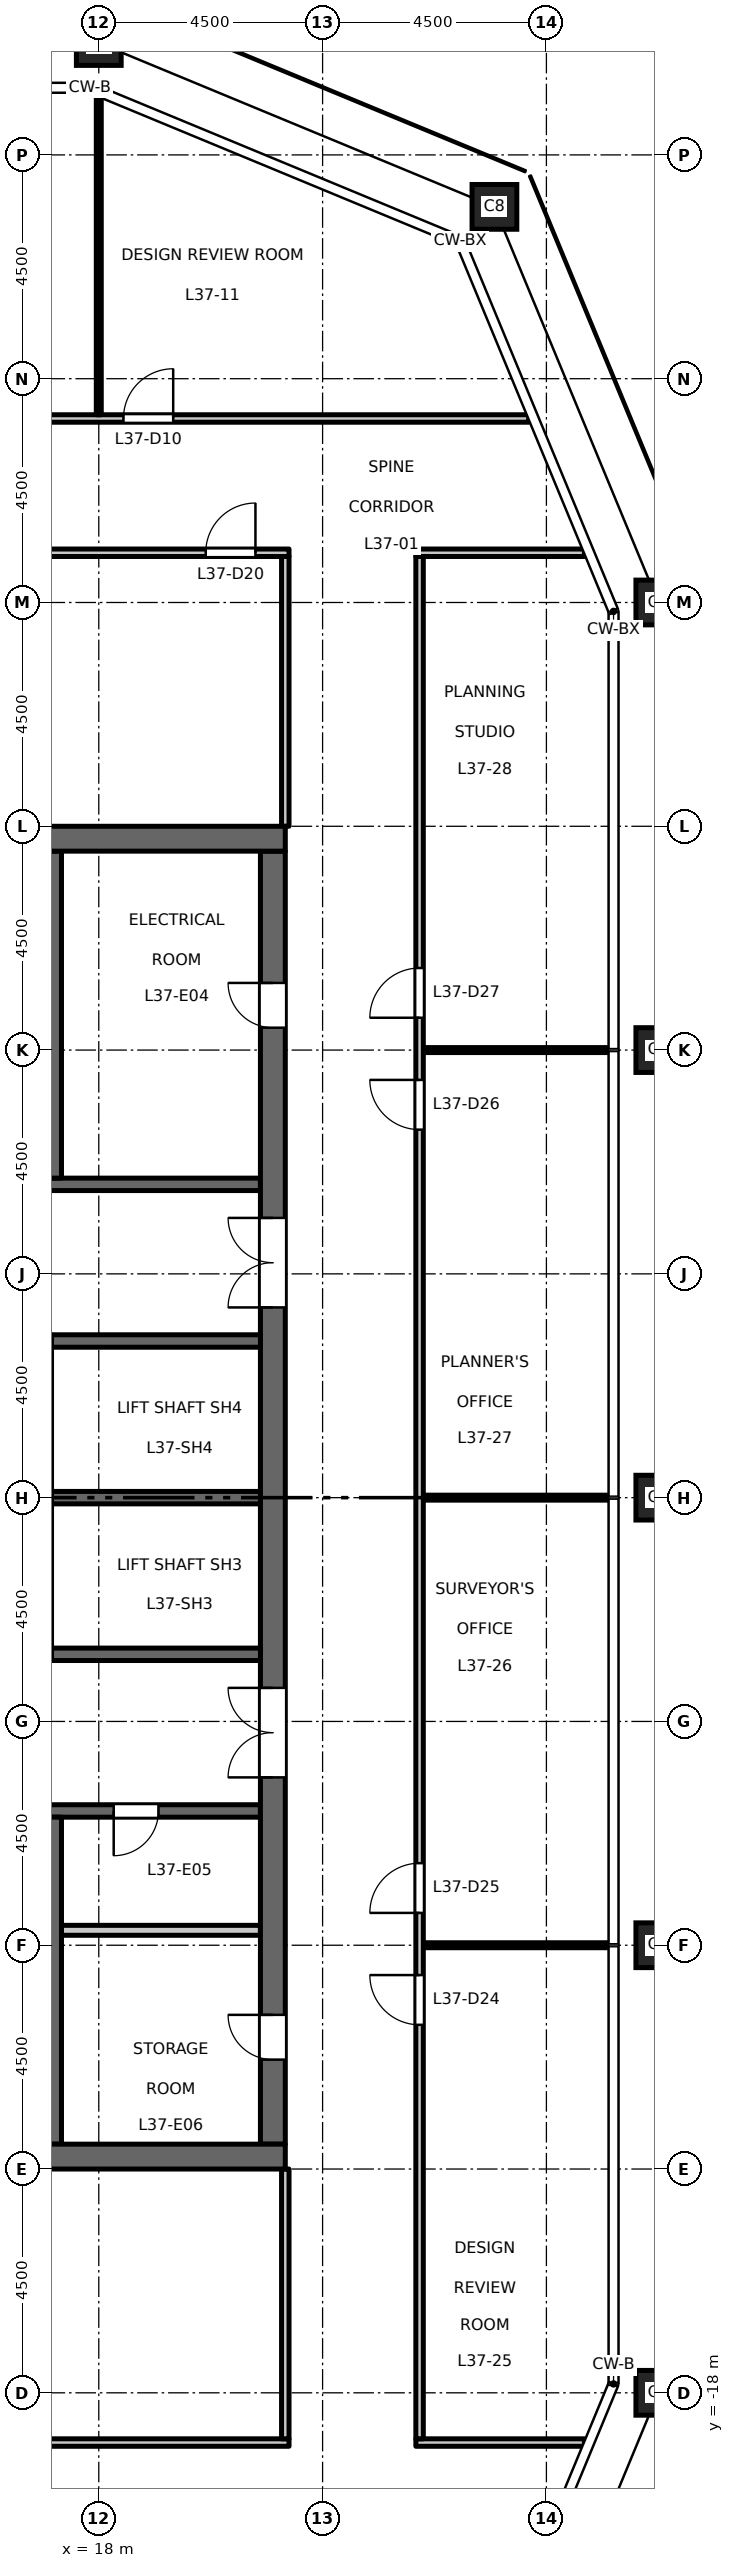
"""IFC4 building model, lengths in metres.
Left out: names, types, materials, properties, quantities, classifications, styles, units other than length and angle.
Written with IfcOpenShell. Run it as: python <this file> out.ifc"""

import sys

from ifc_helpers import new_model, si_unit, direction, frame, frame_2d, origin, origin_2d, place, context, subcontext, project, spatial, rectangle, hollow_rectangle, extrude, element, fill, save


model = new_model("IFC4")
c1 = context("Model", 3, precision=1e-05, world=origin(), true_north=direction((0.0, 1.0)))
c2 = subcontext(c1, "Body", "Model", "MODEL_VIEW")
j1 = project(units=[si_unit("LENGTHUNIT", "METRE"), si_unit("PLANEANGLEUNIT", "RADIAN")], contexts=[c1])
p1 = place(None, origin())
s1 = spatial("IfcSite", under=j1, at=p1, CompositionType="ELEMENT")
p2 = place(p1, origin())
s2 = spatial("IfcBuilding", under=s1, at=p2, CompositionType="ELEMENT")
p3 = place(p2, frame((0.0, 0.0, 172.2)))
s3 = spatial("IfcBuildingStorey", under=s2, at=p3, CompositionType="ELEMENT", Elevation=172.2)
for number, where, z_axis, x_axis in (
    (1, (29.25, -18.0, 0.0), (0.0, 0.0, 1.0), (1.0, 0.0, 0.0)),
    (2, (29.25, -9.0, 0.0), (0.0, 0.0, 1.0), (1.0, 0.0, 0.0)),
    (3, (29.25, 0.0, 0.0), (0.0, 0.0, 1.0), (1.0, 0.0, 0.0)),
    (4, (29.25, 9.0, 0.0), (0.0, 0.0, 1.0), (1.0, 0.0, 0.0)),
    (5, (29.25, 18.0, 0.0), (0.0, 0.0, 1.0), (1.0, 0.0, 0.0)),
    (6, (25.955, 25.955, 0.0), (0.0, 0.0, 1.0), (1.0, 0.0, 0.0)),
    (7, (18.0, 29.25, 0.0), (0.0, 0.0, 1.0), (1.0, 0.0, 0.0)),
):
    element("IfcColumn", number, at=place(p3, frame(where, z_axis=z_axis, x_axis=x_axis)), inside=s3, PredefinedType="COLUMN", context=c2, shape_type="SweptSolid", body=[
        extrude(hollow_rectangle(XDim=0.9, YDim=0.9, WallThickness=0.05, at=origin_2d()), origin(), (0.0, 0.0, 1.0), 4.5),
    ])
p4 = place(p3, frame((17.0, 6.3, 0.0), z_axis=(0.0, 0.0, 1.0), x_axis=(1.0, 0.0, 0.0)))
e8 = element("IfcWall", 8, at=p4, inside=s3, PredefinedType="SHEAR", context=c2, shape_type="SweptSolid", body=[
    extrude(rectangle(XDim=4.25, YDim=0.25, at=frame_2d((2.125, 0.0))), origin(), (0.0, 0.0, 1.0), 4.35),
])
p5 = place(p3, frame((12.15, -6.3, 0.0), z_axis=(0.0, 0.0, 1.0), x_axis=(1.0, 0.0, 0.0)))
e9 = element("IfcWall", 9, at=p5, inside=s3, PredefinedType="SHEAR", context=c2, shape_type="SweptSolid", body=[
    extrude(rectangle(XDim=9.1, YDim=0.25, at=frame_2d((4.55, 0.0))), origin(), (0.0, 0.0, 1.0), 4.35),
])
p6 = place(p5, frame((1.8, 0.0, 0.0)))
e10 = element("IfcOpeningElement", 10, at=p6, cuts=e9, PredefinedType="OPENING", context=c2, shape_type="SweptSolid", body=[
    extrude(rectangle(XDim=1.0, YDim=2.1, at=frame_2d((0.5, 1.05))), frame((0.0, 0.135, 0.0), z_axis=(0.0, -1.0, 0.0), x_axis=(1.0, 0.0, 0.0)), (0.0, 0.0, 1.0), 0.27),
])
p7 = place(p5, frame((6.15, 0.0, 0.0)))
e11 = element("IfcOpeningElement", 11, at=p7, cuts=e9, PredefinedType="OPENING", context=c2, shape_type="SweptSolid", body=[
    extrude(rectangle(XDim=0.9, YDim=2.1, at=frame_2d((0.45, 1.05))), frame((0.0, 0.135, 0.0), z_axis=(0.0, -1.0, 0.0), x_axis=(1.0, 0.0, 0.0)), (0.0, 0.0, 1.0), 0.27),
])
p8 = place(p3, frame((21.5, -13.0, 0.0), z_axis=(0.0, 0.0, 1.0), x_axis=(0.0, 1.0, 0.0)))
e12 = element("IfcWall", 12, at=p8, inside=s3, PredefinedType="SHEAR", context=c2, shape_type="SweptSolid", body=[
    extrude(rectangle(XDim=26.0, YDim=0.5, at=frame_2d((13.0, 0.0))), origin(), (0.0, 0.0, 1.0), 4.35),
])
p9 = place(p8, frame((16.825, 0.0, 0.0)))
e13 = element("IfcOpeningElement", 13, at=p9, cuts=e12, PredefinedType="OPENING", context=c2, shape_type="SweptSolid", body=[
    extrude(rectangle(XDim=1.8, YDim=2.1, at=frame_2d((0.9, 1.05))), frame((0.0, 0.26, 0.0), z_axis=(0.0, -1.0, 0.0), x_axis=(1.0, 0.0, 0.0)), (0.0, 0.0, 1.0), 0.52),
])
p10 = place(p8, frame((7.375, 0.0, 0.0)))
e14 = element("IfcOpeningElement", 14, at=p10, cuts=e12, PredefinedType="OPENING", context=c2, shape_type="SweptSolid", body=[
    extrude(rectangle(XDim=1.8, YDim=2.1, at=frame_2d((0.9, 1.05))), frame((0.0, 0.26, 0.0), z_axis=(0.0, -1.0, 0.0), x_axis=(1.0, 0.0, 0.0)), (0.0, 0.0, 1.0), 0.52),
])
p11 = place(p8, frame((22.45, 0.0, 0.0)))
e15 = element("IfcOpeningElement", 15, at=p11, cuts=e12, PredefinedType="OPENING", context=c2, shape_type="SweptSolid", body=[
    extrude(rectangle(XDim=0.9, YDim=2.1, at=frame_2d((0.45, 1.05))), frame((0.0, 0.26, 0.0), z_axis=(0.0, -1.0, 0.0), x_axis=(1.0, 0.0, 0.0)), (0.0, 0.0, 1.0), 0.52),
])
p12 = place(p8, frame((1.7, 0.0, 0.0)))
e16 = element("IfcOpeningElement", 16, at=p12, cuts=e12, PredefinedType="OPENING", context=c2, shape_type="SweptSolid", body=[
    extrude(rectangle(XDim=0.9, YDim=2.1, at=frame_2d((0.45, 1.05))), frame((0.0, 0.26, 0.0), z_axis=(0.0, -1.0, 0.0), x_axis=(1.0, 0.0, 0.0)), (0.0, 0.0, 1.0), 0.52),
])
p13 = place(p3, frame((17.25, -8.7, 0.0), z_axis=(0.0, 0.0, 1.0), x_axis=(1.0, 0.0, 0.0)))
e17 = element("IfcWall", 17, at=p13, inside=s3, PredefinedType="PARTITIONING", context=c2, shape_type="SweptSolid", body=[
    extrude(rectangle(XDim=4.0, YDim=0.2, at=frame_2d((2.0, 0.0))), origin(), (0.0, 0.0, 1.0), 4.35),
])
for number, where, z_axis, x_axis in (
    (18, (17.05, 0.0, 0.0), (0.0, 0.0, 1.0), (1.0, 0.0, 0.0)),
    (19, (17.05, 3.15, 0.0), (0.0, 0.0, 1.0), (1.0, 0.0, 0.0)),
    (20, (17.05, -3.15, 0.0), (0.0, 0.0, 1.0), (1.0, 0.0, 0.0)),
):
    element("IfcWall", number, at=place(p3, frame(where, z_axis=z_axis, x_axis=x_axis)), inside=s3, PredefinedType="SHEAR", context=c2, shape_type="SweptSolid", body=[
        extrude(rectangle(XDim=4.2, YDim=0.25, at=frame_2d((2.1, 0.0))), origin(), (0.0, 0.0, 1.0), 4.35),
    ])
for number, where, z_axis, x_axis in (
    (21, (17.0, 6.425, 0.0), (0.0, 0.0, 1.0), (0.0, 1.0, 0.0)),
    (22, (17.0, -13.0, 0.0), (0.0, 0.0, 1.0), (0.0, 1.0, 0.0)),
):
    element("IfcWall", number, at=place(p3, frame(where, z_axis=z_axis, x_axis=x_axis)), inside=s3, PredefinedType="SHEAR", context=c2, shape_type="SweptSolid", body=[
        extrude(rectangle(XDim=6.575, YDim=0.5, at=frame_2d((3.288, 0.0))), origin(), (0.0, 0.0, 1.0), 4.35),
    ])
for number, where, z_axis, x_axis in (
    (23, (8.25, 13.25, 0.0), (0.0, 0.0, 1.0), (1.0, 0.0, 0.0)),
    (24, (8.25, -13.25, 0.0), (0.0, 0.0, 1.0), (1.0, 0.0, 0.0)),
):
    element("IfcWall", number, at=place(p3, frame(where, z_axis=z_axis, x_axis=x_axis)), inside=s3, PredefinedType="SHEAR", context=c2, shape_type="SweptSolid", body=[
        extrude(rectangle(XDim=13.5, YDim=0.5, at=frame_2d((6.75, 0.0))), origin(), (0.0, 0.0, 1.0), 4.35),
    ])
p14 = place(p3, frame((-21.825, -19.0, 0.0), z_axis=(0.0, 0.0, 1.0), x_axis=(1.0, 0.0, 0.0)))
e25 = element("IfcWall", 25, at=p14, inside=s3, PredefinedType="PARTITIONING", context=c2, shape_type="SweptSolid", body=[
    extrude(rectangle(XDim=43.65, YDim=0.15, at=frame_2d((21.825, 0.0))), origin(), (0.0, 0.0, 1.0), 4.35),
])
p15 = place(p14, frame((14.175, 0.0, 0.0)))
e26 = element("IfcOpeningElement", 26, at=p15, cuts=e25, PredefinedType="OPENING", context=c2, shape_type="SweptSolid", body=[
    extrude(rectangle(XDim=1.0, YDim=2.1, at=frame_2d((0.5, 1.05))), frame((0.0, 0.085, 0.0), z_axis=(0.0, -1.0, 0.0), x_axis=(1.0, 0.0, 0.0)), (0.0, 0.0, 1.0), 0.17),
])
p16 = place(p14, frame((11.925, 0.0, 0.0)))
e27 = element("IfcOpeningElement", 27, at=p16, cuts=e25, PredefinedType="OPENING", context=c2, shape_type="SweptSolid", body=[
    extrude(rectangle(XDim=1.0, YDim=2.1, at=frame_2d((0.5, 1.05))), frame((0.0, 0.085, 0.0), z_axis=(0.0, -1.0, 0.0), x_axis=(1.0, 0.0, 0.0)), (0.0, 0.0, 1.0), 0.17),
])
p17 = place(p14, frame((30.675, 0.0, 0.0)))
e28 = element("IfcOpeningElement", 28, at=p17, cuts=e25, PredefinedType="OPENING", context=c2, shape_type="SweptSolid", body=[
    extrude(rectangle(XDim=1.0, YDim=2.1, at=frame_2d((0.5, 1.05))), frame((0.0, 0.085, 0.0), z_axis=(0.0, -1.0, 0.0), x_axis=(1.0, 0.0, 0.0)), (0.0, 0.0, 1.0), 0.17),
])
p18 = place(p3, frame((24.375, -19.0, 0.0), z_axis=(0.0, 0.0, 1.0), x_axis=(1.0, 0.0, 0.0)))
e29 = element("IfcWall", 29, at=p18, inside=s3, PredefinedType="PARTITIONING", context=c2, shape_type="SweptSolid", body=[
    extrude(rectangle(XDim=3.389, YDim=0.15, at=frame_2d((1.694, 0.0))), origin(), (0.0, 0.0, 1.0), 4.35),
])
for number, where, z_axis, x_axis in (
    (30, (24.525, -9.0, 0.0), (0.0, 0.0, 1.0), (1.0, 0.0, 0.0)),
    (31, (24.525, 0.0, 0.0), (0.0, 0.0, 1.0), (1.0, 0.0, 0.0)),
    (32, (24.525, 9.0, 0.0), (0.0, 0.0, 1.0), (1.0, 0.0, 0.0)),
):
    element("IfcWall", number, at=place(p3, frame(where, z_axis=z_axis, x_axis=x_axis)), inside=s3, PredefinedType="PARTITIONING", context=c2, shape_type="SweptSolid", body=[
        extrude(rectangle(XDim=3.735, YDim=0.1, at=frame_2d((1.868, 0.0))), origin(), (0.0, 0.0, 1.0), 4.35),
    ])
p19 = place(p3, frame((-21.825, 19.0, 0.0), z_axis=(0.0, 0.0, 1.0), x_axis=(1.0, 0.0, 0.0)))
e33 = element("IfcWall", 33, at=p19, inside=s3, PredefinedType="PARTITIONING", context=c2, shape_type="SweptSolid", body=[
    extrude(rectangle(XDim=43.65, YDim=0.15, at=frame_2d((21.825, 0.0))), origin(), (0.0, 0.0, 1.0), 4.35),
])
p20 = place(p19, frame((14.225, 0.0, 0.0)))
e34 = element("IfcOpeningElement", 34, at=p20, cuts=e33, PredefinedType="OPENING", context=c2, shape_type="SweptSolid", body=[
    extrude(rectangle(XDim=1.0, YDim=2.1, at=frame_2d((0.5, 1.05))), frame((0.0, 0.085, 0.0), z_axis=(0.0, -1.0, 0.0), x_axis=(1.0, 0.0, 0.0)), (0.0, 0.0, 1.0), 0.17),
])
p21 = place(p19, frame((0.725, 0.0, 0.0)))
e35 = element("IfcOpeningElement", 35, at=p21, cuts=e33, PredefinedType="OPENING", context=c2, shape_type="SweptSolid", body=[
    extrude(rectangle(XDim=1.0, YDim=2.1, at=frame_2d((0.5, 1.05))), frame((0.0, 0.085, 0.0), z_axis=(0.0, -1.0, 0.0), x_axis=(1.0, 0.0, 0.0)), (0.0, 0.0, 1.0), 0.17),
])
p22 = place(p19, frame((41.975, 0.0, 0.0)))
e36 = element("IfcOpeningElement", 36, at=p22, cuts=e33, PredefinedType="OPENING", context=c2, shape_type="SweptSolid", body=[
    extrude(rectangle(XDim=1.0, YDim=2.1, at=frame_2d((0.5, 1.05))), frame((0.0, 0.085, 0.0), z_axis=(0.0, -1.0, 0.0), x_axis=(1.0, 0.0, 0.0)), (0.0, 0.0, 1.0), 0.17),
])
p23 = place(p3, frame((24.375, 19.0, 0.0), z_axis=(0.0, 0.0, 1.0), x_axis=(1.0, 0.0, 0.0)))
e37 = element("IfcWall", 37, at=p23, inside=s3, PredefinedType="PARTITIONING", context=c2, shape_type="SweptSolid", body=[
    extrude(rectangle(XDim=3.389, YDim=0.15, at=frame_2d((1.694, 0.0))), origin(), (0.0, 0.0, 1.0), 4.35),
])
p24 = place(p3, frame((-26.646, 21.7, 0.0), z_axis=(0.0, 0.0, 1.0), x_axis=(1.0, 0.0, 0.0)))
e38 = element("IfcWall", 38, at=p24, inside=s3, PredefinedType="PARTITIONING", context=c2, shape_type="SweptSolid", body=[
    extrude(rectangle(XDim=53.292, YDim=0.15, at=frame_2d((26.646, 0.0))), origin(), (0.0, 0.0, 1.0), 4.35),
])
p25 = place(p24, frame((15.996, 0.0, 0.0)))
e39 = element("IfcOpeningElement", 39, at=p25, cuts=e38, PredefinedType="OPENING", context=c2, shape_type="SweptSolid", body=[
    extrude(rectangle(XDim=1.0, YDim=2.1, at=frame_2d((0.5, 1.05))), frame((0.0, 0.085, 0.0), z_axis=(0.0, -1.0, 0.0), x_axis=(1.0, 0.0, 0.0)), (0.0, 0.0, 1.0), 0.17),
])
p26 = place(p24, frame((18.246, 0.0, 0.0)))
e40 = element("IfcOpeningElement", 40, at=p26, cuts=e38, PredefinedType="OPENING", context=c2, shape_type="SweptSolid", body=[
    extrude(rectangle(XDim=1.0, YDim=2.1, at=frame_2d((0.5, 1.05))), frame((0.0, 0.085, 0.0), z_axis=(0.0, -1.0, 0.0), x_axis=(1.0, 0.0, 0.0)), (0.0, 0.0, 1.0), 0.17),
])
p27 = place(p24, frame((33.996, 0.0, 0.0)))
e41 = element("IfcOpeningElement", 41, at=p27, cuts=e38, PredefinedType="OPENING", context=c2, shape_type="SweptSolid", body=[
    extrude(rectangle(XDim=1.0, YDim=2.1, at=frame_2d((0.5, 1.05))), frame((0.0, 0.085, 0.0), z_axis=(0.0, -1.0, 0.0), x_axis=(1.0, 0.0, 0.0)), (0.0, 0.0, 1.0), 0.17),
])
p28 = place(p24, frame((36.246, 0.0, 0.0)))
e42 = element("IfcOpeningElement", 42, at=p28, cuts=e38, PredefinedType="OPENING", context=c2, shape_type="SweptSolid", body=[
    extrude(rectangle(XDim=1.0, YDim=2.1, at=frame_2d((0.5, 1.05))), frame((0.0, 0.085, 0.0), z_axis=(0.0, -1.0, 0.0), x_axis=(1.0, 0.0, 0.0)), (0.0, 0.0, 1.0), 0.17),
])
p29 = place(p24, frame((6.996, 0.0, 0.0)))
e43 = element("IfcOpeningElement", 43, at=p29, cuts=e38, PredefinedType="OPENING", context=c2, shape_type="SweptSolid", body=[
    extrude(rectangle(XDim=1.0, YDim=2.1, at=frame_2d((0.5, 1.05))), frame((0.0, 0.085, 0.0), z_axis=(0.0, -1.0, 0.0), x_axis=(1.0, 0.0, 0.0)), (0.0, 0.0, 1.0), 0.17),
])
p30 = place(p24, frame((45.142, 0.0, 0.0)))
e44 = element("IfcOpeningElement", 44, at=p30, cuts=e38, PredefinedType="OPENING", context=c2, shape_type="SweptSolid", body=[
    extrude(rectangle(XDim=1.0, YDim=2.1, at=frame_2d((0.5, 1.05))), frame((0.0, 0.085, 0.0), z_axis=(0.0, -1.0, 0.0), x_axis=(1.0, 0.0, 0.0)), (0.0, 0.0, 1.0), 0.17),
])
p31 = place(p3, frame((18.0, 21.775, 0.0), z_axis=(0.0, 0.0, 1.0), x_axis=(0.0, 1.0, 0.0)))
e45 = element("IfcWall", 45, at=p31, inside=s3, PredefinedType="PARTITIONING", context=c2, shape_type="SweptSolid", body=[
    extrude(rectangle(XDim=6.403, YDim=0.1, at=frame_2d((3.202, 0.0))), origin(), (0.0, 0.0, 1.0), 3.45),
])
for number, where, z_axis, x_axis in (
    (46, (21.75, -18.925, 0.0), (0.0, 0.0, 1.0), (0.0, 1.0, 0.0)),
    (47, (21.75, 13.5, 0.0), (0.0, 0.0, 1.0), (0.0, 1.0, 0.0)),
):
    element("IfcWall", number, at=place(p3, frame(where, z_axis=z_axis, x_axis=x_axis)), inside=s3, PredefinedType="PARTITIONING", context=c2, shape_type="SweptSolid", body=[
        extrude(rectangle(XDim=5.425, YDim=0.15, at=frame_2d((2.712, 0.0))), origin(), (0.0, 0.0, 1.0), 4.35),
    ])
p32 = place(p3, frame((24.45, -18.925, 0.0), z_axis=(0.0, 0.0, 1.0), x_axis=(0.0, 1.0, 0.0)))
e48 = element("IfcWall", 48, at=p32, inside=s3, PredefinedType="PARTITIONING", context=c2, shape_type="SweptSolid", body=[
    extrude(rectangle(XDim=37.85, YDim=0.15, at=frame_2d((18.925, 0.0))), origin(), (0.0, 0.0, 1.0), 4.35),
])
p33 = place(p32, frame((8.325, 0.0, 0.0)))
e49 = element("IfcOpeningElement", 49, at=p33, cuts=e48, PredefinedType="OPENING", context=c2, shape_type="SweptSolid", body=[
    extrude(rectangle(XDim=1.0, YDim=2.1, at=frame_2d((0.5, 1.05))), frame((0.0, 0.085, 0.0), z_axis=(0.0, -1.0, 0.0), x_axis=(1.0, 0.0, 0.0)), (0.0, 0.0, 1.0), 0.17),
])
p34 = place(p32, frame((10.575, 0.0, 0.0)))
e50 = element("IfcOpeningElement", 50, at=p34, cuts=e48, PredefinedType="OPENING", context=c2, shape_type="SweptSolid", body=[
    extrude(rectangle(XDim=1.0, YDim=2.1, at=frame_2d((0.5, 1.05))), frame((0.0, 0.085, 0.0), z_axis=(0.0, -1.0, 0.0), x_axis=(1.0, 0.0, 0.0)), (0.0, 0.0, 1.0), 0.17),
])
p35 = place(p32, frame((26.325, 0.0, 0.0)))
e51 = element("IfcOpeningElement", 51, at=p35, cuts=e48, PredefinedType="OPENING", context=c2, shape_type="SweptSolid", body=[
    extrude(rectangle(XDim=1.0, YDim=2.1, at=frame_2d((0.5, 1.05))), frame((0.0, 0.085, 0.0), z_axis=(0.0, -1.0, 0.0), x_axis=(1.0, 0.0, 0.0)), (0.0, 0.0, 1.0), 0.17),
])
p36 = place(p32, frame((28.575, 0.0, 0.0)))
e52 = element("IfcOpeningElement", 52, at=p36, cuts=e48, PredefinedType="OPENING", context=c2, shape_type="SweptSolid", body=[
    extrude(rectangle(XDim=1.0, YDim=2.1, at=frame_2d((0.5, 1.05))), frame((0.0, 0.085, 0.0), z_axis=(0.0, -1.0, 0.0), x_axis=(1.0, 0.0, 0.0)), (0.0, 0.0, 1.0), 0.17),
])
p37 = place(p9, origin())
e53 = element("IfcDoor", 53, at=p37, inside=s3, OperationType="DOUBLE_DOOR_DOUBLE_SWING", PredefinedType="DOOR", context=c2, shape_type="SweptSolid", body=[
    extrude(rectangle(XDim=1.8, YDim=2.1, at=frame_2d((0.9, 1.05))), frame((0.0, 0.025, 0.0), z_axis=(0.0, -1.0, 0.0), x_axis=(1.0, 0.0, 0.0)), (0.0, 0.0, 1.0), 0.05),
])
fill(e13, e53)
p38 = place(p10, origin())
e54 = element("IfcDoor", 54, at=p38, inside=s3, OperationType="DOUBLE_DOOR_DOUBLE_SWING", PredefinedType="DOOR", context=c2, shape_type="SweptSolid", body=[
    extrude(rectangle(XDim=1.8, YDim=2.1, at=frame_2d((0.9, 1.05))), frame((0.0, 0.025, 0.0), z_axis=(0.0, -1.0, 0.0), x_axis=(1.0, 0.0, 0.0)), (0.0, 0.0, 1.0), 0.05),
])
fill(e14, e54)
p39 = place(p11, origin())
e55 = element("IfcDoor", 55, at=p39, inside=s3, OperationType="SINGLE_SWING_LEFT", PredefinedType="DOOR", context=c2, shape_type="SweptSolid", body=[
    extrude(rectangle(XDim=0.9, YDim=2.1, at=frame_2d((0.45, 1.05))), frame((0.0, 0.025, 0.0), z_axis=(0.0, -1.0, 0.0), x_axis=(1.0, 0.0, 0.0)), (0.0, 0.0, 1.0), 0.05),
])
fill(e15, e55)
p40 = place(p7, origin())
e56 = element("IfcDoor", 56, at=p40, inside=s3, OperationType="SINGLE_SWING_LEFT", PredefinedType="DOOR", context=c2, shape_type="SweptSolid", body=[
    extrude(rectangle(XDim=0.9, YDim=2.1, at=frame_2d((0.45, 1.05))), frame((0.0, 0.025, 0.0), z_axis=(0.0, -1.0, 0.0), x_axis=(1.0, 0.0, 0.0)), (0.0, 0.0, 1.0), 0.05),
])
fill(e11, e56)
p41 = place(p12, origin())
e57 = element("IfcDoor", 57, at=p41, inside=s3, OperationType="SINGLE_SWING_LEFT", PredefinedType="DOOR", context=c2, shape_type="SweptSolid", body=[
    extrude(rectangle(XDim=0.9, YDim=2.1, at=frame_2d((0.45, 1.05))), frame((0.0, 0.025, 0.0), z_axis=(0.0, -1.0, 0.0), x_axis=(1.0, 0.0, 0.0)), (0.0, 0.0, 1.0), 0.05),
])
fill(e16, e57)
p42 = place(p30, origin())
e58 = element("IfcDoor", 58, at=p42, inside=s3, OperationType="SINGLE_SWING_RIGHT", PredefinedType="DOOR", context=c2, shape_type="SweptSolid", body=[
    extrude(rectangle(XDim=1.0, YDim=2.1, at=frame_2d((0.5, 1.05))), frame((0.0, 0.025, 0.0), z_axis=(0.0, -1.0, 0.0), x_axis=(1.0, 0.0, 0.0)), (0.0, 0.0, 1.0), 0.05),
])
fill(e44, e58)
p43 = place(p22, origin())
e59 = element("IfcDoor", 59, at=p43, inside=s3, OperationType="SINGLE_SWING_RIGHT", PredefinedType="DOOR", context=c2, shape_type="SweptSolid", body=[
    extrude(rectangle(XDim=1.0, YDim=2.1, at=frame_2d((0.5, 1.05))), frame((0.0, 0.025, 0.0), z_axis=(0.0, -1.0, 0.0), x_axis=(1.0, 0.0, 0.0)), (0.0, 0.0, 1.0), 0.05),
])
fill(e36, e59)
p44 = place(p33, origin())
e60 = element("IfcDoor", 60, at=p44, inside=s3, OperationType="SINGLE_SWING_RIGHT", PredefinedType="DOOR", context=c2, shape_type="SweptSolid", body=[
    extrude(rectangle(XDim=1.0, YDim=2.1, at=frame_2d((0.5, 1.05))), frame((0.0, 0.025, 0.0), z_axis=(0.0, -1.0, 0.0), x_axis=(1.0, 0.0, 0.0)), (0.0, 0.0, 1.0), 0.05),
])
fill(e49, e60)
p45 = place(p34, origin())
e61 = element("IfcDoor", 61, at=p45, inside=s3, OperationType="SINGLE_SWING_LEFT", PredefinedType="DOOR", context=c2, shape_type="SweptSolid", body=[
    extrude(rectangle(XDim=1.0, YDim=2.1, at=frame_2d((0.5, 1.05))), frame((0.0, 0.025, 0.0), z_axis=(0.0, -1.0, 0.0), x_axis=(1.0, 0.0, 0.0)), (0.0, 0.0, 1.0), 0.05),
])
fill(e50, e61)
p46 = place(p35, origin())
e62 = element("IfcDoor", 62, at=p46, inside=s3, OperationType="SINGLE_SWING_RIGHT", PredefinedType="DOOR", context=c2, shape_type="SweptSolid", body=[
    extrude(rectangle(XDim=1.0, YDim=2.1, at=frame_2d((0.5, 1.05))), frame((0.0, 0.025, 0.0), z_axis=(0.0, -1.0, 0.0), x_axis=(1.0, 0.0, 0.0)), (0.0, 0.0, 1.0), 0.05),
])
fill(e51, e62)
p47 = place(p36, origin())
e63 = element("IfcDoor", 63, at=p47, inside=s3, OperationType="SINGLE_SWING_LEFT", PredefinedType="DOOR", context=c2, shape_type="SweptSolid", body=[
    extrude(rectangle(XDim=1.0, YDim=2.1, at=frame_2d((0.5, 1.05))), frame((0.0, 0.025, 0.0), z_axis=(0.0, -1.0, 0.0), x_axis=(1.0, 0.0, 0.0)), (0.0, 0.0, 1.0), 0.05),
])
fill(e52, e63)
save(model, sys.argv[1])
